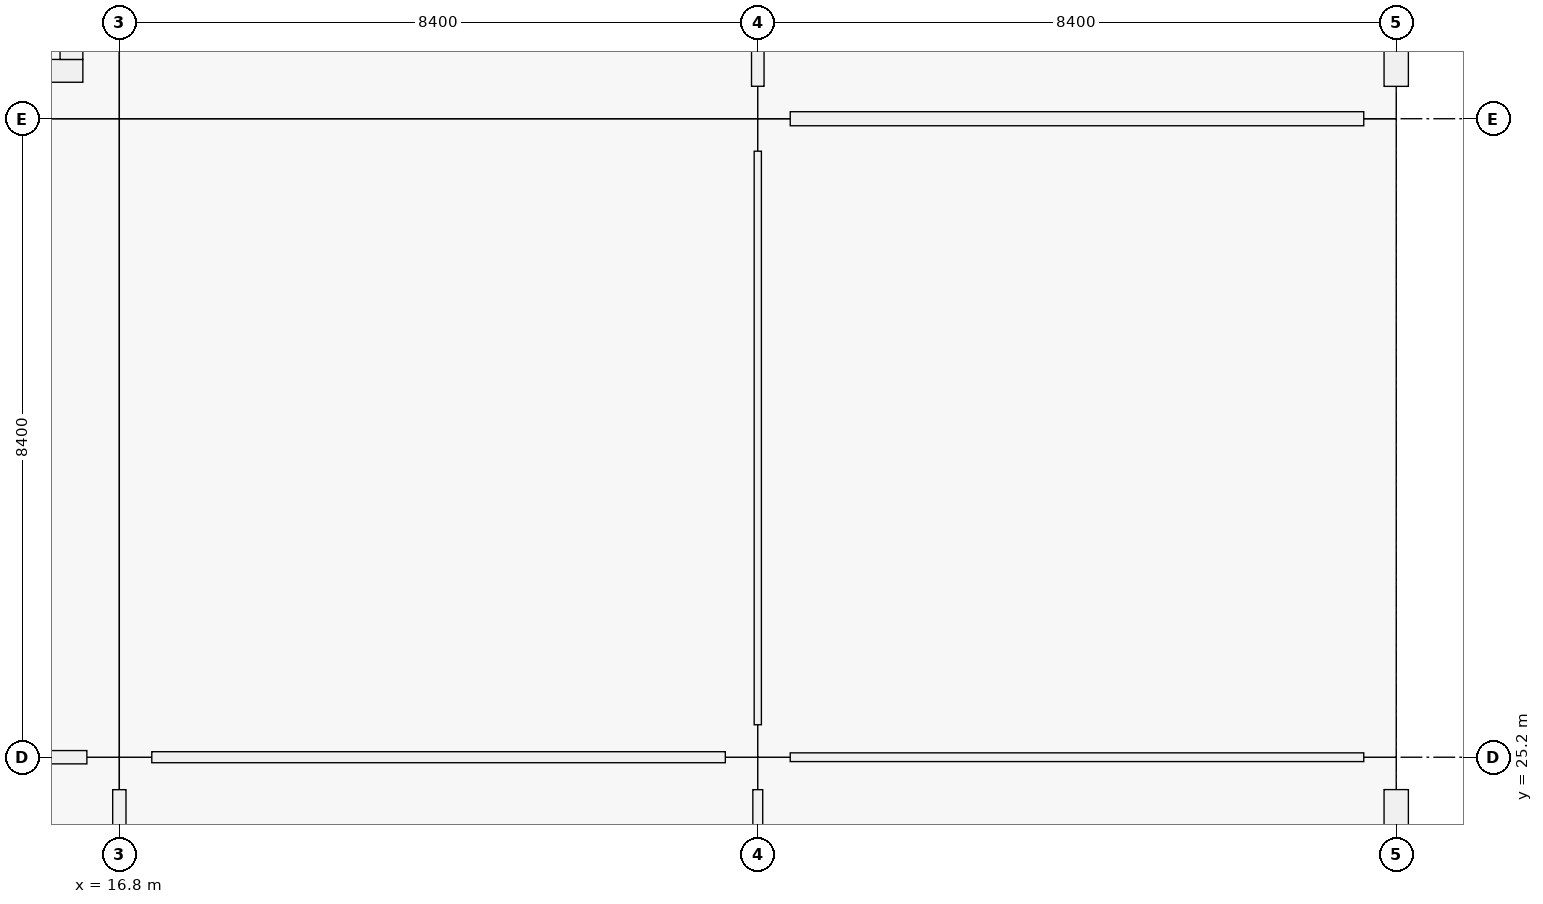
"""IFC4 building model, lengths in metres.
Left out: names, types, materials, properties, quantities, classifications, styles, units other than length and angle.
Written with IfcOpenShell. Run it as: python <this file> out.ifc"""

import sys

from ifc_helpers import new_model, si_unit, direction, frame, frame_2d, origin, origin_2d, place, context, subcontext, project, spatial, rectangle, extrude, element, fill, save


model = new_model("IFC4")
c1 = context("Model", 3, precision=1e-05, world=origin(), true_north=direction((0.0, 1.0)))
c2 = subcontext(c1, "Body", "Model", "MODEL_VIEW")
j1 = project(units=[si_unit("LENGTHUNIT", "METRE"), si_unit("PLANEANGLEUNIT", "RADIAN")], contexts=[c1])
p1 = place(None, origin())
s1 = spatial("IfcSite", under=j1, at=p1, CompositionType="ELEMENT")
p2 = place(p1, origin())
s2 = spatial("IfcBuilding", under=s1, at=p2, CompositionType="ELEMENT")
p3 = place(p2, origin())
s3 = spatial("IfcBuildingStorey", under=s2, at=p3, CompositionType="ELEMENT", Elevation=0.0)
for number, where, z_axis, x_axis in (
    (1, (16.8, 25.2, 0.0), (0.0, 0.0, 1.0), (1.0, 0.0, 0.0)),
    (2, (16.8, 33.6, 0.0), (0.0, 0.0, 1.0), (1.0, 0.0, 0.0)),
    (3, (25.2, 25.2, 0.0), (0.0, 0.0, 1.0), (1.0, 0.0, 0.0)),
    (4, (25.2, 33.6, 0.0), (0.0, 0.0, 1.0), (1.0, 0.0, 0.0)),
    (5, (33.6, 25.2, 0.0), (0.0, 0.0, 1.0), (1.0, 0.0, 0.0)),
    (6, (33.6, 33.6, 0.0), (0.0, 0.0, 1.0), (1.0, 0.0, 0.0)),
):
    element("IfcColumn", number, at=place(p3, frame(where, z_axis=z_axis, x_axis=x_axis)), inside=s3, PredefinedType="COLUMN", context=c2, shape_type="SweptSolid", body=[
        extrude(rectangle(XDim=0.85, YDim=0.85, at=origin_2d()), origin(), (0.0, 0.0, 1.0), 5.76),
    ])
p4 = place(p3, frame((33.6, 24.774, 0.0), z_axis=(0.0, 0.0, 1.0), x_axis=(0.0, -1.0, 0.0)))
e7 = element("IfcWall", 7, at=p4, inside=s3, PredefinedType="SOLIDWALL", context=c2, shape_type="SweptSolid", body=[
    extrude(rectangle(XDim=7.548, YDim=0.32, at=frame_2d((3.774, 0.0))), origin(), (0.0, 0.0, 1.0), 4.7),
])
p5 = place(p4, frame((2.674, 0.0, 0.9)))
e8 = element("IfcOpeningElement", 8, at=p5, cuts=e7, PredefinedType="OPENING", context=c2, shape_type="SweptSolid", body=[
    extrude(rectangle(XDim=2.2, YDim=1.35, at=frame_2d((1.1, 0.675))), frame((0.0, 0.16, 0.0), z_axis=(0.0, -1.0, 0.0), x_axis=(1.0, 0.0, 0.0)), (0.0, 0.0, 1.0), 0.32),
])
p6 = place(p3, frame((33.6, 41.574, 0.0), z_axis=(0.0, 0.0, 1.0), x_axis=(0.0, -1.0, 0.0)))
e9 = element("IfcWall", 9, at=p6, inside=s3, PredefinedType="SOLIDWALL", context=c2, shape_type="SweptSolid", body=[
    extrude(rectangle(XDim=7.548, YDim=0.32, at=frame_2d((3.774, 0.0))), origin(), (0.0, 0.0, 1.0), 4.7),
])
p7 = place(p6, frame((2.874, 0.0, 0.9)))
e10 = element("IfcOpeningElement", 10, at=p7, cuts=e9, PredefinedType="OPENING", context=c2, shape_type="SweptSolid", body=[
    extrude(rectangle(XDim=1.8, YDim=1.35, at=frame_2d((0.9, 0.675))), frame((0.0, 0.16, 0.0), z_axis=(0.0, -1.0, 0.0), x_axis=(1.0, 0.0, 0.0)), (0.0, 0.0, 1.0), 0.32),
])
p8 = place(p3, frame((16.32, 34.23, 0.0), z_axis=(0.0, 0.0, 1.0), x_axis=(-1.0, 0.0, 0.0)))
e11 = element("IfcWall", 11, at=p8, inside=s3, PredefinedType="SHEAR", context=c2, shape_type="SweptSolid", body=[
    extrude(rectangle(XDim=7.44, YDim=0.3, at=frame_2d((3.72, 0.0))), origin(), (0.0, 0.0, 1.0), 5.76),
])
p9 = place(p8, frame((1.28, 0.0, 0.0)))
e12 = element("IfcOpeningElement", 12, at=p9, cuts=e11, PredefinedType="OPENING", context=c2, shape_type="SweptSolid", body=[
    extrude(rectangle(XDim=1.5, YDim=2.15, at=frame_2d((0.75, 1.075))), frame((0.0, 0.15, 0.0), z_axis=(0.0, -1.0, 0.0), x_axis=(1.0, 0.0, 0.0)), (0.0, 0.0, 1.0), 0.3),
])
p10 = place(p3, frame((16.17, 41.22, 0.0), z_axis=(0.0, 0.0, 1.0), x_axis=(0.0, -1.0, 0.0)))
e13 = element("IfcWall", 13, at=p10, inside=s3, PredefinedType="SHEAR", context=c2, shape_type="SweptSolid", body=[
    extrude(rectangle(XDim=6.84, YDim=0.3, at=frame_2d((3.42, 0.0))), origin(), (0.0, 0.0, 1.0), 5.76),
])
p11 = place(p3, frame((8.827, 25.2, 0.0), z_axis=(0.0, 0.0, 1.0), x_axis=(1.0, 0.0, 0.0)))
e14 = element("IfcWall", 14, at=p11, inside=s3, PredefinedType="PARTITIONING", context=c2, shape_type="SweptSolid", body=[
    extrude(rectangle(XDim=7.546, YDim=0.175, at=frame_2d((3.773, 0.0))), origin(), (0.0, 0.0, 1.0), 3.66),
])
p12 = place(p11, frame((3.253, 0.0, 0.0)))
e15 = element("IfcOpeningElement", 15, at=p12, cuts=e14, PredefinedType="OPENING", context=c2, shape_type="SweptSolid", body=[
    extrude(rectangle(XDim=1.04, YDim=2.2, at=frame_2d((0.52, 1.1))), frame((0.0, 0.087, 0.0), z_axis=(0.0, -1.0, 0.0), x_axis=(1.0, 0.0, 0.0)), (0.0, 0.0, 1.0), 0.175),
])
p13 = place(p3, frame((17.227, 25.2, 0.0), z_axis=(0.0, 0.0, 1.0), x_axis=(1.0, 0.0, 0.0)))
e16 = element("IfcWall", 16, at=p13, inside=s3, PredefinedType="PARTITIONING", context=c2, shape_type="SweptSolid", body=[
    extrude(rectangle(XDim=7.546, YDim=0.145, at=frame_2d((3.773, 0.0))), origin(), (0.0, 0.0, 1.0), 3.66),
])
p14 = place(p13, frame((3.273, 0.0, 0.0)))
e17 = element("IfcOpeningElement", 17, at=p14, cuts=e16, PredefinedType="OPENING", context=c2, shape_type="SweptSolid", body=[
    extrude(rectangle(XDim=1.0, YDim=2.2, at=frame_2d((0.5, 1.1))), frame((0.0, 0.073, 0.0), z_axis=(0.0, -1.0, 0.0), x_axis=(1.0, 0.0, 0.0)), (0.0, 0.0, 1.0), 0.145),
])
p15 = place(p3, frame((25.627, 25.2, 0.0), z_axis=(0.0, 0.0, 1.0), x_axis=(1.0, 0.0, 0.0)))
e18 = element("IfcWall", 18, at=p15, inside=s3, PredefinedType="PARTITIONING", context=c2, shape_type="SweptSolid", body=[
    extrude(rectangle(XDim=7.546, YDim=0.115, at=frame_2d((3.773, 0.0))), origin(), (0.0, 0.0, 1.0), 3.66),
])
p16 = place(p15, frame((3.288, 0.0, 0.0)))
e19 = element("IfcOpeningElement", 19, at=p16, cuts=e18, PredefinedType="OPENING", context=c2, shape_type="SweptSolid", body=[
    extrude(rectangle(XDim=0.97, YDim=2.12, at=frame_2d((0.485, 1.06))), frame((0.0, 0.058, 0.0), z_axis=(0.0, -1.0, 0.0), x_axis=(1.0, 0.0, 0.0)), (0.0, 0.0, 1.0), 0.115),
])
p17 = place(p3, frame((25.627, 33.6, 0.0), z_axis=(0.0, 0.0, 1.0), x_axis=(1.0, 0.0, 0.0)))
e20 = element("IfcWall", 20, at=p17, inside=s3, PredefinedType="PARTITIONING", context=c2, shape_type="SweptSolid", body=[
    extrude(rectangle(XDim=7.546, YDim=0.185, at=frame_2d((3.773, 0.0))), origin(), (0.0, 0.0, 1.0), 3.66),
])
p18 = place(p17, frame((3.308, 0.0, 0.0)))
e21 = element("IfcOpeningElement", 21, at=p18, cuts=e20, PredefinedType="OPENING", context=c2, shape_type="SweptSolid", body=[
    extrude(rectangle(XDim=0.93, YDim=2.12, at=frame_2d((0.465, 1.06))), frame((0.0, 0.093, 0.0), z_axis=(0.0, -1.0, 0.0), x_axis=(1.0, 0.0, 0.0)), (0.0, 0.0, 1.0), 0.185),
])
p19 = place(p3, frame((16.8, 17.227, 0.0), z_axis=(0.0, 0.0, 1.0), x_axis=(0.0, 1.0, 0.0)))
e22 = element("IfcWall", 22, at=p19, inside=s3, PredefinedType="PARTITIONING", context=c2, shape_type="SweptSolid", body=[
    extrude(rectangle(XDim=7.546, YDim=0.175, at=frame_2d((3.773, 0.0))), origin(), (0.0, 0.0, 1.0), 3.66),
])
p20 = place(p19, frame((3.313, 0.0, 0.0)))
e23 = element("IfcOpeningElement", 23, at=p20, cuts=e22, PredefinedType="OPENING", context=c2, shape_type="SweptSolid", body=[
    extrude(rectangle(XDim=0.92, YDim=2.15, at=frame_2d((0.46, 1.075))), frame((0.0, 0.087, 0.0), z_axis=(0.0, -1.0, 0.0), x_axis=(1.0, 0.0, 0.0)), (0.0, 0.0, 1.0), 0.175),
])
p21 = place(p3, frame((25.2, 17.227, 0.0), z_axis=(0.0, 0.0, 1.0), x_axis=(0.0, 1.0, 0.0)))
e24 = element("IfcWall", 24, at=p21, inside=s3, PredefinedType="MOVABLE", context=c2, shape_type="SweptSolid", body=[
    extrude(rectangle(XDim=7.546, YDim=0.13, at=frame_2d((3.773, 0.0))), origin(), (0.0, 0.0, 1.0), 3.66),
])
p22 = place(p21, frame((3.268, 0.0, 0.0)))
e25 = element("IfcOpeningElement", 25, at=p22, cuts=e24, PredefinedType="OPENING", context=c2, shape_type="SweptSolid", body=[
    extrude(rectangle(XDim=1.01, YDim=2.12, at=frame_2d((0.505, 1.06))), frame((0.0, 0.065, 0.0), z_axis=(0.0, -1.0, 0.0), x_axis=(1.0, 0.0, 0.0)), (0.0, 0.0, 1.0), 0.13),
])
p23 = place(p3, frame((25.2, 25.627, 0.0), z_axis=(0.0, 0.0, 1.0), x_axis=(0.0, 1.0, 0.0)))
e26 = element("IfcWall", 26, at=p23, inside=s3, PredefinedType="PARTITIONING", context=c2, shape_type="SweptSolid", body=[
    extrude(rectangle(XDim=7.546, YDim=0.095, at=frame_2d((3.773, 0.0))), origin(), (0.0, 0.0, 1.0), 3.66),
])
p24 = place(p23, frame((3.283, 0.0, 0.0)))
e27 = element("IfcOpeningElement", 27, at=p24, cuts=e26, PredefinedType="OPENING", context=c2, shape_type="SweptSolid", body=[
    extrude(rectangle(XDim=0.98, YDim=2.18, at=frame_2d((0.49, 1.09))), frame((0.0, 0.047, 0.0), z_axis=(0.0, -1.0, 0.0), x_axis=(1.0, 0.0, 0.0)), (0.0, 0.0, 1.0), 0.095),
])
p25 = place(p3, frame((25.2, 34.027, 0.0), z_axis=(0.0, 0.0, 1.0), x_axis=(0.0, 1.0, 0.0)))
e28 = element("IfcWall", 28, at=p25, inside=s3, PredefinedType="PARTITIONING", context=c2, shape_type="SweptSolid", body=[
    extrude(rectangle(XDim=7.546, YDim=0.165, at=frame_2d((3.773, 0.0))), origin(), (0.0, 0.0, 1.0), 3.66),
])
p26 = place(p25, frame((3.293, 0.0, 0.0)))
e29 = element("IfcOpeningElement", 29, at=p26, cuts=e28, PredefinedType="OPENING", context=c2, shape_type="SweptSolid", body=[
    extrude(rectangle(XDim=0.96, YDim=2.18, at=frame_2d((0.48, 1.09))), frame((0.0, 0.083, 0.0), z_axis=(0.0, -1.0, 0.0), x_axis=(1.0, 0.0, 0.0)), (0.0, 0.0, 1.0), 0.165),
])
p27 = place(p14, origin())
e30 = element("IfcDoor", 30, at=p27, inside=s3, OperationType="SINGLE_SWING_LEFT", PredefinedType="DOOR", context=c2, shape_type="SweptSolid", body=[
    extrude(rectangle(XDim=1.0, YDim=2.2, at=frame_2d((0.5, 1.1))), frame((0.0, 0.025, 0.0), z_axis=(0.0, -1.0, 0.0), x_axis=(1.0, 0.0, 0.0)), (0.0, 0.0, 1.0), 0.05),
])
fill(e17, e30)
p28 = place(p24, origin())
e31 = element("IfcDoor", 31, at=p28, inside=s3, OperationType="SINGLE_SWING_LEFT", PredefinedType="DOOR", context=c2, shape_type="SweptSolid", body=[
    extrude(rectangle(XDim=0.98, YDim=2.18, at=frame_2d((0.49, 1.09))), frame((0.0, 0.025, 0.0), z_axis=(0.0, -1.0, 0.0), x_axis=(1.0, 0.0, 0.0)), (0.0, 0.0, 1.0), 0.05),
])
fill(e27, e31)
p29 = place(p16, origin())
e32 = element("IfcDoor", 32, at=p29, inside=s3, OperationType="SINGLE_SWING_LEFT", PredefinedType="DOOR", context=c2, shape_type="SweptSolid", body=[
    extrude(rectangle(XDim=0.97, YDim=2.12, at=frame_2d((0.485, 1.06))), frame((0.0, 0.025, 0.0), z_axis=(0.0, -1.0, 0.0), x_axis=(1.0, 0.0, 0.0)), (0.0, 0.0, 1.0), 0.05),
])
fill(e19, e32)
p30 = place(p18, origin())
e33 = element("IfcDoor", 33, at=p30, inside=s3, OperationType="SINGLE_SWING_RIGHT", PredefinedType="DOOR", context=c2, shape_type="SweptSolid", body=[
    extrude(rectangle(XDim=0.93, YDim=2.12, at=frame_2d((0.465, 1.06))), frame((0.0, 0.025, 0.0), z_axis=(0.0, -1.0, 0.0), x_axis=(1.0, 0.0, 0.0)), (0.0, 0.0, 1.0), 0.05),
])
fill(e21, e33)
save(model, sys.argv[1])
